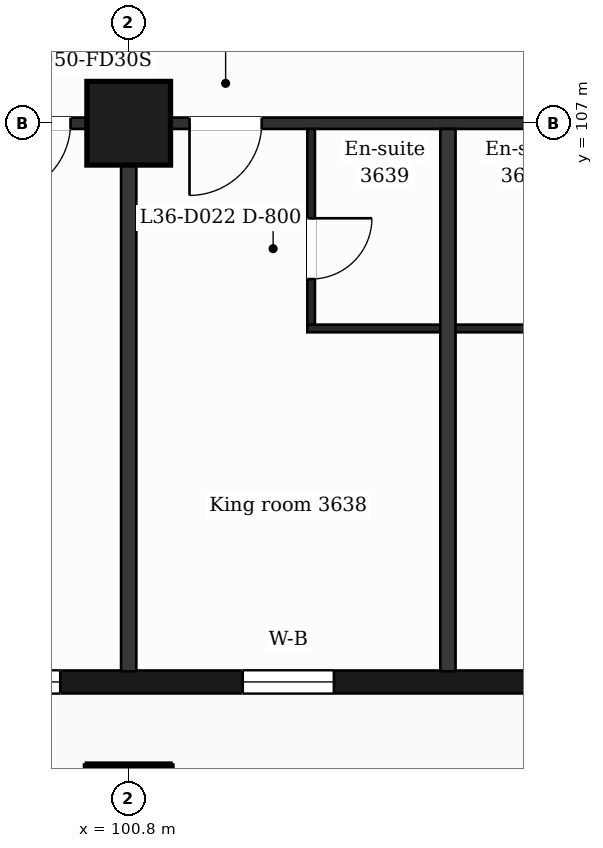
"""IFC4 building model, lengths in metres.
Left out: names, types, materials, properties, quantities, classifications, styles, units other than length and angle.
Written with IfcOpenShell. Run it as: python <this file> out.ifc"""

import sys

from ifc_helpers import new_model, si_unit, direction, frame, frame_2d, origin, origin_2d, place, context, subcontext, project, spatial, rectangle, extrude, element, fill, save


model = new_model("IFC4")
c1 = context("Model", 3, precision=1e-05, world=origin(), true_north=direction((0.0, 1.0)))
c2 = subcontext(c1, "Body", "Model", "MODEL_VIEW")
j1 = project(units=[si_unit("LENGTHUNIT", "METRE"), si_unit("PLANEANGLEUNIT", "RADIAN")], contexts=[c1])
p1 = place(None, origin())
s1 = spatial("IfcSite", under=j1, at=p1, CompositionType="ELEMENT")
p2 = place(p1, origin())
s2 = spatial("IfcBuilding", under=s1, at=p2, CompositionType="ELEMENT")
p3 = place(p2, frame((0.0, 0.0, 155.2)))
s3 = spatial("IfcBuildingStorey", under=s2, at=p3, CompositionType="ELEMENT", Elevation=155.2)
for number, where, z_axis, x_axis in (
    (1, (100.8, 98.0, 0.0), (0.0, 0.0, 1.0), (1.0, 0.0, 0.0)),
    (2, (100.8, 107.0, 0.0), (0.0, 0.0, 1.0), (1.0, 0.0, 0.0)),
):
    element("IfcColumn", number, at=place(p3, frame(where, z_axis=z_axis, x_axis=x_axis)), inside=s3, PredefinedType="COLUMN", context=c2, shape_type="SweptSolid", body=[
        extrude(rectangle(XDim=1.1, YDim=1.1, at=origin_2d()), origin(), (0.0, 0.0, 1.0), 3.7),
    ])
p4 = place(p3, frame((89.85, 99.65, 0.0), z_axis=(0.0, 0.0, 1.0), x_axis=(1.0, 0.0, 0.0)))
e3 = element("IfcWall", 3, at=p4, inside=s3, PredefinedType="SOLIDWALL", context=c2, shape_type="SweptSolid", body=[
    extrude(rectangle(XDim=47.25, YDim=0.3, at=frame_2d((23.625, 0.0))), origin(), (0.0, 0.0, 1.0), 3.38),
])
p5 = place(p4, frame((0.725, 0.0, 0.9)))
e4 = element("IfcOpeningElement", 4, at=p5, cuts=e3, PredefinedType="OPENING", context=c2, shape_type="SweptSolid", body=[
    extrude(rectangle(XDim=1.2, YDim=2.1, at=frame_2d((0.6, 1.05))), frame((0.0, 0.16, 0.0), z_axis=(0.0, -1.0, 0.0), x_axis=(1.0, 0.0, 0.0)), (0.0, 0.0, 1.0), 0.32),
])
p6 = place(p4, frame((3.45, 0.0, 0.9)))
e5 = element("IfcOpeningElement", 5, at=p6, cuts=e3, PredefinedType="OPENING", context=c2, shape_type="SweptSolid", body=[
    extrude(rectangle(XDim=2.4, YDim=2.1, at=frame_2d((1.2, 1.05))), frame((0.0, 0.16, 0.0), z_axis=(0.0, -1.0, 0.0), x_axis=(1.0, 0.0, 0.0)), (0.0, 0.0, 1.0), 0.32),
])
p7 = place(p4, frame((7.65, 0.0, 0.9)))
e6 = element("IfcOpeningElement", 6, at=p7, cuts=e3, PredefinedType="OPENING", context=c2, shape_type="SweptSolid", body=[
    extrude(rectangle(XDim=2.4, YDim=2.1, at=frame_2d((1.2, 1.05))), frame((0.0, 0.16, 0.0), z_axis=(0.0, -1.0, 0.0), x_axis=(1.0, 0.0, 0.0)), (0.0, 0.0, 1.0), 0.32),
])
p8 = place(p4, frame((12.45, 0.0, 0.9)))
e7 = element("IfcOpeningElement", 7, at=p8, cuts=e3, PredefinedType="OPENING", context=c2, shape_type="SweptSolid", body=[
    extrude(rectangle(XDim=1.2, YDim=2.1, at=frame_2d((0.6, 1.05))), frame((0.0, 0.16, 0.0), z_axis=(0.0, -1.0, 0.0), x_axis=(1.0, 0.0, 0.0)), (0.0, 0.0, 1.0), 0.32),
])
p9 = place(p4, frame((16.65, 0.0, 0.9)))
e8 = element("IfcOpeningElement", 8, at=p9, cuts=e3, PredefinedType="OPENING", context=c2, shape_type="SweptSolid", body=[
    extrude(rectangle(XDim=1.2, YDim=2.1, at=frame_2d((0.6, 1.05))), frame((0.0, 0.16, 0.0), z_axis=(0.0, -1.0, 0.0), x_axis=(1.0, 0.0, 0.0)), (0.0, 0.0, 1.0), 0.32),
])
p10 = place(p4, frame((19.95, 0.0, 0.0)))
e9 = element("IfcOpeningElement", 9, at=p10, cuts=e3, PredefinedType="OPENING", context=c2, shape_type="SweptSolid", body=[
    extrude(rectangle(XDim=1.2, YDim=2.4, at=frame_2d((0.6, 1.2))), frame((0.0, 0.16, 0.0), z_axis=(0.0, -1.0, 0.0), x_axis=(1.0, 0.0, 0.0)), (0.0, 0.0, 1.0), 0.32),
])
p11 = place(p4, frame((21.75, 0.0, 0.9)))
e10 = element("IfcOpeningElement", 10, at=p11, cuts=e3, PredefinedType="OPENING", context=c2, shape_type="SweptSolid", body=[
    extrude(rectangle(XDim=1.2, YDim=2.1, at=frame_2d((0.6, 1.05))), frame((0.0, 0.16, 0.0), z_axis=(0.0, -1.0, 0.0), x_axis=(1.0, 0.0, 0.0)), (0.0, 0.0, 1.0), 0.32),
])
p12 = place(p4, frame((24.45, 0.0, 0.9)))
e11 = element("IfcOpeningElement", 11, at=p12, cuts=e3, PredefinedType="OPENING", context=c2, shape_type="SweptSolid", body=[
    extrude(rectangle(XDim=2.4, YDim=2.1, at=frame_2d((1.2, 1.05))), frame((0.0, 0.16, 0.0), z_axis=(0.0, -1.0, 0.0), x_axis=(1.0, 0.0, 0.0)), (0.0, 0.0, 1.0), 0.32),
])
p13 = place(p4, frame((28.35, 0.0, 0.0)))
e12 = element("IfcOpeningElement", 12, at=p13, cuts=e3, PredefinedType="OPENING", context=c2, shape_type="SweptSolid", body=[
    extrude(rectangle(XDim=1.2, YDim=2.4, at=frame_2d((0.6, 1.2))), frame((0.0, 0.16, 0.0), z_axis=(0.0, -1.0, 0.0), x_axis=(1.0, 0.0, 0.0)), (0.0, 0.0, 1.0), 0.32),
])
p14 = place(p4, frame((30.15, 0.0, 0.9)))
e13 = element("IfcOpeningElement", 13, at=p14, cuts=e3, PredefinedType="OPENING", context=c2, shape_type="SweptSolid", body=[
    extrude(rectangle(XDim=1.2, YDim=2.1, at=frame_2d((0.6, 1.05))), frame((0.0, 0.16, 0.0), z_axis=(0.0, -1.0, 0.0), x_axis=(1.0, 0.0, 0.0)), (0.0, 0.0, 1.0), 0.32),
])
p15 = place(p4, frame((32.85, 0.0, 0.9)))
e14 = element("IfcOpeningElement", 14, at=p15, cuts=e3, PredefinedType="OPENING", context=c2, shape_type="SweptSolid", body=[
    extrude(rectangle(XDim=2.4, YDim=2.1, at=frame_2d((1.2, 1.05))), frame((0.0, 0.16, 0.0), z_axis=(0.0, -1.0, 0.0), x_axis=(1.0, 0.0, 0.0)), (0.0, 0.0, 1.0), 0.32),
])
p16 = place(p4, frame((37.05, 0.0, 0.9)))
e15 = element("IfcOpeningElement", 15, at=p16, cuts=e3, PredefinedType="OPENING", context=c2, shape_type="SweptSolid", body=[
    extrude(rectangle(XDim=2.4, YDim=2.1, at=frame_2d((1.2, 1.05))), frame((0.0, 0.16, 0.0), z_axis=(0.0, -1.0, 0.0), x_axis=(1.0, 0.0, 0.0)), (0.0, 0.0, 1.0), 0.32),
])
p17 = place(p4, frame((41.85, 0.0, 0.9)))
e16 = element("IfcOpeningElement", 16, at=p17, cuts=e3, PredefinedType="OPENING", context=c2, shape_type="SweptSolid", body=[
    extrude(rectangle(XDim=1.2, YDim=2.1, at=frame_2d((0.6, 1.05))), frame((0.0, 0.16, 0.0), z_axis=(0.0, -1.0, 0.0), x_axis=(1.0, 0.0, 0.0)), (0.0, 0.0, 1.0), 0.32),
])
p18 = place(p4, frame((45.25, 0.0, 0.9)))
e17 = element("IfcOpeningElement", 17, at=p18, cuts=e3, PredefinedType="OPENING", context=c2, shape_type="SweptSolid", body=[
    extrude(rectangle(XDim=1.2, YDim=2.1, at=frame_2d((0.6, 1.05))), frame((0.0, 0.16, 0.0), z_axis=(0.0, -1.0, 0.0), x_axis=(1.0, 0.0, 0.0)), (0.0, 0.0, 1.0), 0.32),
])
p19 = place(p3, frame((103.15, 104.3, 0.0), z_axis=(0.0, 0.0, 1.0), x_axis=(1.0, 0.0, 0.0)))
e18 = element("IfcWall", 18, at=p19, inside=s3, PredefinedType="PARTITIONING", context=c2, shape_type="SweptSolid", body=[
    extrude(rectangle(XDim=3.7, YDim=0.1, at=frame_2d((1.85, 0.0))), origin(), (0.0, 0.0, 1.0), 3.38),
])
p20 = place(p3, frame((87.018, 107.0, 0.0), z_axis=(0.0, 0.0, 1.0), x_axis=(1.0, 0.0, 0.0)))
e19 = element("IfcWall", 19, at=p20, inside=s3, PredefinedType="PARTITIONING", context=c2, shape_type="SweptSolid", body=[
    extrude(rectangle(XDim=52.765, YDim=0.15, at=frame_2d((26.382, 0.0))), origin(), (0.0, 0.0, 1.0), 3.38),
])
p21 = place(p20, frame((0.707, 0.0, 0.0)))
e20 = element("IfcOpeningElement", 20, at=p21, cuts=e19, PredefinedType="OPENING", context=c2, shape_type="SweptSolid", body=[
    extrude(rectangle(XDim=0.95, YDim=2.1, at=frame_2d((0.475, 1.05))), frame((0.0, 0.085, 0.0), z_axis=(0.0, -1.0, 0.0), x_axis=(1.0, 0.0, 0.0)), (0.0, 0.0, 1.0), 0.17),
])
p22 = place(p20, frame((7.645, 0.0, 0.0)))
e21 = element("IfcOpeningElement", 21, at=p22, cuts=e19, PredefinedType="OPENING", context=c2, shape_type="SweptSolid", body=[
    extrude(rectangle(XDim=0.95, YDim=2.1, at=frame_2d((0.475, 1.05))), frame((0.0, 0.085, 0.0), z_axis=(0.0, -1.0, 0.0), x_axis=(1.0, 0.0, 0.0)), (0.0, 0.0, 1.0), 0.17),
])
p23 = place(p20, frame((12.067, 0.0, 0.0)))
e22 = element("IfcOpeningElement", 22, at=p23, cuts=e19, PredefinedType="OPENING", context=c2, shape_type="SweptSolid", body=[
    extrude(rectangle(XDim=0.95, YDim=2.1, at=frame_2d((0.475, 1.05))), frame((0.0, 0.085, 0.0), z_axis=(0.0, -1.0, 0.0), x_axis=(1.0, 0.0, 0.0)), (0.0, 0.0, 1.0), 0.17),
])
p24 = place(p20, frame((14.582, 0.0, 0.0)))
e23 = element("IfcOpeningElement", 23, at=p24, cuts=e19, PredefinedType="OPENING", context=c2, shape_type="SweptSolid", body=[
    extrude(rectangle(XDim=0.95, YDim=2.1, at=frame_2d((0.475, 1.05))), frame((0.0, 0.085, 0.0), z_axis=(0.0, -1.0, 0.0), x_axis=(1.0, 0.0, 0.0)), (0.0, 0.0, 1.0), 0.17),
])
p25 = place(p20, frame((20.432, 0.0, 0.0)))
e24 = element("IfcOpeningElement", 24, at=p25, cuts=e19, PredefinedType="OPENING", context=c2, shape_type="SweptSolid", body=[
    extrude(rectangle(XDim=0.95, YDim=2.1, at=frame_2d((0.475, 1.05))), frame((0.0, 0.085, 0.0), z_axis=(0.0, -1.0, 0.0), x_axis=(1.0, 0.0, 0.0)), (0.0, 0.0, 1.0), 0.17),
])
p26 = place(p20, frame((23.532, 0.0, 0.0)))
e25 = element("IfcOpeningElement", 25, at=p26, cuts=e19, PredefinedType="OPENING", context=c2, shape_type="SweptSolid", body=[
    extrude(rectangle(XDim=1.0, YDim=2.1, at=frame_2d((0.5, 1.05))), frame((0.0, 0.085, 0.0), z_axis=(0.0, -1.0, 0.0), x_axis=(1.0, 0.0, 0.0)), (0.0, 0.0, 1.0), 0.17),
])
p27 = place(p20, frame((36.807, 0.0, 0.0)))
e26 = element("IfcOpeningElement", 26, at=p27, cuts=e19, PredefinedType="OPENING", context=c2, shape_type="SweptSolid", body=[
    extrude(rectangle(XDim=1.0, YDim=2.1, at=frame_2d((0.5, 1.05))), frame((0.0, 0.085, 0.0), z_axis=(0.0, -1.0, 0.0), x_axis=(1.0, 0.0, 0.0)), (0.0, 0.0, 1.0), 0.17),
])
p28 = place(p20, frame((43.457, 0.0, 0.0)))
e27 = element("IfcOpeningElement", 27, at=p28, cuts=e19, PredefinedType="OPENING", context=c2, shape_type="SweptSolid", body=[
    extrude(rectangle(XDim=0.95, YDim=2.1, at=frame_2d((0.475, 1.05))), frame((0.0, 0.085, 0.0), z_axis=(0.0, -1.0, 0.0), x_axis=(1.0, 0.0, 0.0)), (0.0, 0.0, 1.0), 0.17),
])
p29 = place(p20, frame((48.974, 0.0, 0.0)))
e28 = element("IfcOpeningElement", 28, at=p29, cuts=e19, PredefinedType="OPENING", context=c2, shape_type="SweptSolid", body=[
    extrude(rectangle(XDim=0.95, YDim=2.1, at=frame_2d((0.475, 1.05))), frame((0.0, 0.085, 0.0), z_axis=(0.0, -1.0, 0.0), x_axis=(1.0, 0.0, 0.0)), (0.0, 0.0, 1.0), 0.17),
])
p30 = place(p3, frame((100.8, 99.79, 0.0), z_axis=(0.0, 0.0, 1.0), x_axis=(0.0, 1.0, 0.0)))
e29 = element("IfcWall", 29, at=p30, inside=s3, PredefinedType="PARTITIONING", context=c2, shape_type="SweptSolid", body=[
    extrude(rectangle(XDim=7.135, YDim=0.2, at=frame_2d((3.567, 0.0))), origin(), (0.0, 0.0, 1.0), 3.38),
])
p31 = place(p3, frame((103.2, 104.35, 0.0), z_axis=(0.0, 0.0, 1.0), x_axis=(0.0, 1.0, 0.0)))
e30 = element("IfcWall", 30, at=p31, inside=s3, PredefinedType="PARTITIONING", context=c2, shape_type="SweptSolid", body=[
    extrude(rectangle(XDim=2.575, YDim=0.1, at=frame_2d((1.288, 0.0))), origin(), (0.0, 0.0, 1.0), 3.38),
])
p32 = place(p31, frame((0.6, 0.0, 0.0)))
e31 = element("IfcOpeningElement", 31, at=p32, cuts=e30, PredefinedType="OPENING", context=c2, shape_type="SweptSolid", body=[
    extrude(rectangle(XDim=0.8, YDim=2.1, at=frame_2d((0.4, 1.05))), frame((0.0, 0.06, 0.0), z_axis=(0.0, -1.0, 0.0), x_axis=(1.0, 0.0, 0.0)), (0.0, 0.0, 1.0), 0.12),
])
p33 = place(p3, frame((105.0, 99.79, 0.0), z_axis=(0.0, 0.0, 1.0), x_axis=(0.0, 1.0, 0.0)))
e32 = element("IfcWall", 32, at=p33, inside=s3, PredefinedType="PARTITIONING", context=c2, shape_type="SweptSolid", body=[
    extrude(rectangle(XDim=7.135, YDim=0.2, at=frame_2d((3.567, 0.0))), origin(), (0.0, 0.0, 1.0), 3.38),
])
p34 = place(p7, origin())
e33 = element("IfcWindow", 33, at=p34, inside=s3, PartitioningType="SINGLE_PANEL", PredefinedType="WINDOW", context=c2, shape_type="SweptSolid", body=[
    extrude(rectangle(XDim=2.4, YDim=2.1, at=frame_2d((1.2, 1.05))), frame((0.0, 0.03, 0.0), z_axis=(0.0, -1.0, 0.0), x_axis=(1.0, 0.0, 0.0)), (0.0, 0.0, 1.0), 0.06),
])
fill(e6, e33)
p35 = place(p8, origin())
e34 = element("IfcWindow", 34, at=p35, inside=s3, PartitioningType="SINGLE_PANEL", PredefinedType="WINDOW", context=c2, shape_type="SweptSolid", body=[
    extrude(rectangle(XDim=1.2, YDim=2.1, at=frame_2d((0.6, 1.05))), frame((0.0, 0.03, 0.0), z_axis=(0.0, -1.0, 0.0), x_axis=(1.0, 0.0, 0.0)), (0.0, 0.0, 1.0), 0.06),
])
fill(e7, e34)
p36 = place(p23, origin())
e35 = element("IfcDoor", 35, at=p36, inside=s3, OperationType="SINGLE_SWING_LEFT", PredefinedType="DOOR", context=c2, shape_type="SweptSolid", body=[
    extrude(rectangle(XDim=0.95, YDim=2.1, at=frame_2d((0.475, 1.05))), frame((0.0, 0.025, 0.0), z_axis=(0.0, -1.0, 0.0), x_axis=(1.0, 0.0, 0.0)), (0.0, 0.0, 1.0), 0.05),
])
fill(e22, e35)
p37 = place(p24, origin())
e36 = element("IfcDoor", 36, at=p37, inside=s3, OperationType="SINGLE_SWING_LEFT", PredefinedType="DOOR", context=c2, shape_type="SweptSolid", body=[
    extrude(rectangle(XDim=0.95, YDim=2.1, at=frame_2d((0.475, 1.05))), frame((0.0, 0.025, 0.0), z_axis=(0.0, -1.0, 0.0), x_axis=(1.0, 0.0, 0.0)), (0.0, 0.0, 1.0), 0.05),
])
fill(e23, e36)
p38 = place(p32, origin())
e37 = element("IfcDoor", 37, at=p38, inside=s3, OperationType="SINGLE_SWING_RIGHT", PredefinedType="DOOR", context=c2, shape_type="SweptSolid", body=[
    extrude(rectangle(XDim=0.8, YDim=2.1, at=frame_2d((0.4, 1.05))), frame((0.0, 0.025, 0.0), z_axis=(0.0, -1.0, 0.0), x_axis=(1.0, 0.0, 0.0)), (0.0, 0.0, 1.0), 0.05),
])
fill(e31, e37)
save(model, sys.argv[1])
